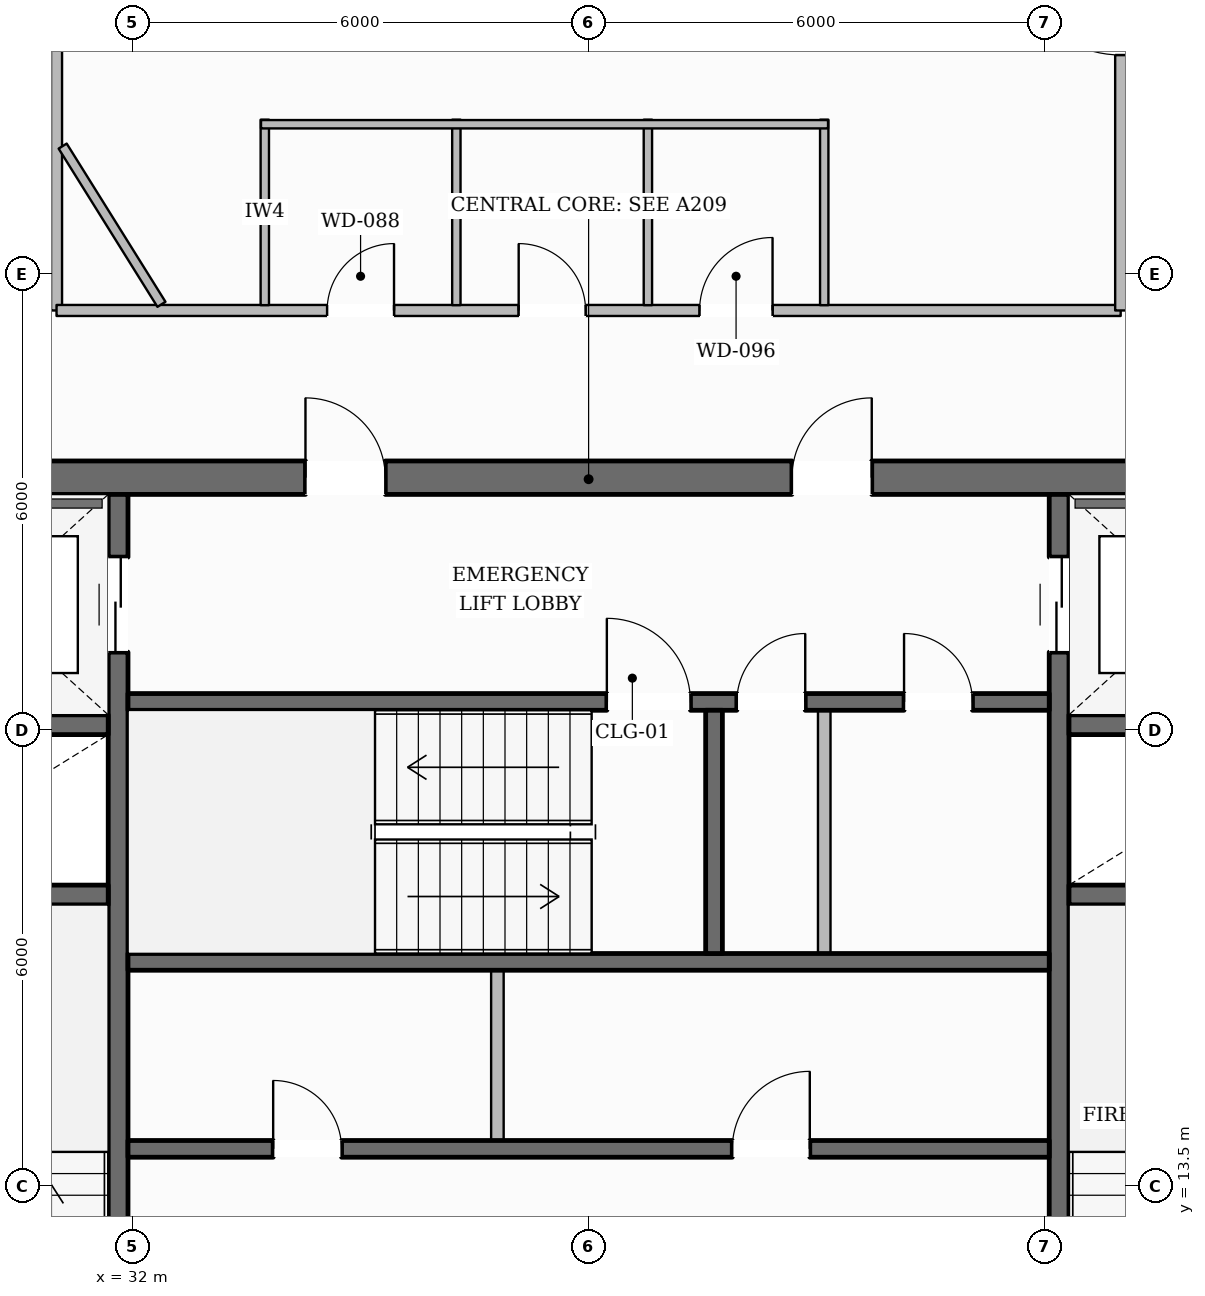
"""IFC4 building model, lengths in metres.
Left out: names, types, materials, properties, quantities, classifications, styles, units other than length and angle.
Written with IfcOpenShell. Run it as: python <this file> out.ifc"""

import sys

from ifc_helpers import new_model, si_unit, direction, frame, frame_2d, origin, place, context, subcontext, project, spatial, rectangle, extrude, element, fill, save


model = new_model("IFC4")
c1 = context("Model", 3, precision=1e-05, world=origin(), true_north=direction((0.0, 1.0)))
c2 = subcontext(c1, "Body", "Model", "MODEL_VIEW")
j1 = project(units=[si_unit("LENGTHUNIT", "METRE"), si_unit("PLANEANGLEUNIT", "RADIAN")], contexts=[c1])
p1 = place(None, origin())
s1 = spatial("IfcSite", under=j1, at=p1, CompositionType="ELEMENT")
p2 = place(p1, origin())
s2 = spatial("IfcBuilding", under=s1, at=p2, CompositionType="ELEMENT")
p3 = place(p2, frame((0.0, 0.0, 215.05)))
s3 = spatial("IfcBuildingStorey", under=s2, at=p3, CompositionType="ELEMENT", Elevation=215.05)
p4 = place(p3, frame((28.04, 22.82, 0.0), z_axis=(0.0, 0.0, 1.0), x_axis=(1.0, 0.0, 0.0)))
e1 = element("IfcWall", 1, at=p4, inside=s3, PredefinedType="SOLIDWALL", context=c2, shape_type="SweptSolid", body=[
    extrude(rectangle(XDim=19.92, YDim=0.44, at=frame_2d((9.96, 0.0))), origin(), (0.0, 0.0, 1.0), 3.6),
])
p5 = place(p4, frame((6.235, 0.0, 0.0)))
e2 = element("IfcOpeningElement", 2, at=p5, cuts=e1, PredefinedType="OPENING", context=c2, shape_type="SweptSolid", body=[
    extrude(rectangle(XDim=1.05, YDim=2.15, at=frame_2d((0.525, 1.075))), frame((0.0, 0.23, 0.0), z_axis=(0.0, -1.0, 0.0), x_axis=(1.0, 0.0, 0.0)), (0.0, 0.0, 1.0), 0.46),
])
p6 = place(p4, frame((12.635, 0.0, 0.0)))
e3 = element("IfcOpeningElement", 3, at=p6, cuts=e1, PredefinedType="OPENING", context=c2, shape_type="SweptSolid", body=[
    extrude(rectangle(XDim=1.05, YDim=2.15, at=frame_2d((0.525, 1.075))), frame((0.0, 0.23, 0.0), z_axis=(0.0, -1.0, 0.0), x_axis=(1.0, 0.0, 0.0)), (0.0, 0.0, 1.0), 0.46),
])
p7 = place(p3, frame((31.81, 9.6, 0.0), z_axis=(0.0, 0.0, 1.0), x_axis=(0.0, 1.0, 0.0)))
e4 = element("IfcWall", 4, at=p7, inside=s3, PredefinedType="SHEAR", context=c2, shape_type="SweptSolid", body=[
    extrude(rectangle(XDim=13.0, YDim=0.26, at=frame_2d((6.5, 0.0))), origin(), (0.0, 0.0, 1.0), 3.6),
])
p8 = place(p7, frame((10.925, 0.0, 0.0)))
e5 = element("IfcOpeningElement", 5, at=p8, cuts=e4, PredefinedType="OPENING", context=c2, shape_type="SweptSolid", body=[
    extrude(rectangle(XDim=1.25, YDim=2.25, at=frame_2d((0.625, 1.125))), frame((0.0, 0.14, 0.0), z_axis=(0.0, -1.0, 0.0), x_axis=(1.0, 0.0, 0.0)), (0.0, 0.0, 1.0), 0.28),
])
p9 = place(p3, frame((44.19, 9.6, 0.0), z_axis=(0.0, 0.0, 1.0), x_axis=(0.0, 1.0, 0.0)))
e6 = element("IfcWall", 6, at=p9, inside=s3, PredefinedType="SHEAR", context=c2, shape_type="SweptSolid", body=[
    extrude(rectangle(XDim=13.0, YDim=0.26, at=frame_2d((6.5, 0.0))), origin(), (0.0, 0.0, 1.0), 3.6),
])
p10 = place(p9, frame((10.925, 0.0, 0.0)))
e7 = element("IfcOpeningElement", 7, at=p10, cuts=e6, PredefinedType="OPENING", context=c2, shape_type="SweptSolid", body=[
    extrude(rectangle(XDim=1.25, YDim=2.25, at=frame_2d((0.625, 1.125))), frame((0.0, 0.14, 0.0), z_axis=(0.0, -1.0, 0.0), x_axis=(1.0, 0.0, 0.0)), (0.0, 0.0, 1.0), 0.28),
])
for number, where, z_axis, x_axis in (
    (8, (28.48, 17.33, 0.0), (0.0, 0.0, 1.0), (1.0, 0.0, 0.0)),
    (9, (28.48, 19.57, 0.0), (0.0, 0.0, 1.0), (1.0, 0.0, 0.0)),
    (10, (44.32, 17.33, 0.0), (0.0, 0.0, 1.0), (1.0, 0.0, 0.0)),
    (11, (44.32, 19.57, 0.0), (0.0, 0.0, 1.0), (1.0, 0.0, 0.0)),
):
    element("IfcWall", number, at=place(p3, frame(where, z_axis=z_axis, x_axis=x_axis)), inside=s3, PredefinedType="SHEAR", context=c2, shape_type="SweptSolid", body=[
        extrude(rectangle(XDim=3.2, YDim=0.26, at=frame_2d((1.6, 0.0))), origin(), (0.0, 0.0, 1.0), 3.6),
    ])
p11 = place(p3, frame((31.94, 19.87, 0.0), z_axis=(0.0, 0.0, 1.0), x_axis=(1.0, 0.0, 0.0)))
e12 = element("IfcWall", 12, at=p11, inside=s3, PredefinedType="SOLIDWALL", context=c2, shape_type="SweptSolid", body=[
    extrude(rectangle(XDim=12.12, YDim=0.22, at=frame_2d((6.06, 0.0))), origin(), (0.0, 0.0, 1.0), 3.6),
])
p12 = place(p11, frame((6.3, 0.0, 0.0)))
e13 = element("IfcOpeningElement", 13, at=p12, cuts=e12, PredefinedType="OPENING", context=c2, shape_type="SweptSolid", body=[
    extrude(rectangle(XDim=1.1, YDim=2.15, at=frame_2d((0.55, 1.075))), frame((0.0, 0.12, 0.0), z_axis=(0.0, -1.0, 0.0), x_axis=(1.0, 0.0, 0.0)), (0.0, 0.0, 1.0), 0.24),
])
p13 = place(p11, frame((8.01, 0.0, 0.0)))
e14 = element("IfcOpeningElement", 14, at=p13, cuts=e12, PredefinedType="OPENING", context=c2, shape_type="SweptSolid", body=[
    extrude(rectangle(XDim=0.9, YDim=2.1, at=frame_2d((0.45, 1.05))), frame((0.0, 0.12, 0.0), z_axis=(0.0, -1.0, 0.0), x_axis=(1.0, 0.0, 0.0)), (0.0, 0.0, 1.0), 0.24),
])
p14 = place(p11, frame((10.21, 0.0, 0.0)))
e15 = element("IfcOpeningElement", 15, at=p14, cuts=e12, PredefinedType="OPENING", context=c2, shape_type="SweptSolid", body=[
    extrude(rectangle(XDim=0.9, YDim=2.1, at=frame_2d((0.45, 1.05))), frame((0.0, 0.12, 0.0), z_axis=(0.0, -1.0, 0.0), x_axis=(1.0, 0.0, 0.0)), (0.0, 0.0, 1.0), 0.24),
])
p15 = place(p3, frame((31.94, 16.45, 0.0), z_axis=(0.0, 0.0, 1.0), x_axis=(1.0, 0.0, 0.0)))
e16 = element("IfcWall", 16, at=p15, inside=s3, PredefinedType="SOLIDWALL", context=c2, shape_type="SweptSolid", body=[
    extrude(rectangle(XDim=12.12, YDim=0.22, at=frame_2d((6.06, 0.0))), origin(), (0.0, 0.0, 1.0), 3.6),
])
p16 = place(p3, frame((39.65, 16.56, 0.0), z_axis=(0.0, 0.0, 1.0), x_axis=(0.0, 1.0, 0.0)))
e17 = element("IfcWall", 17, at=p16, inside=s3, PredefinedType="SOLIDWALL", context=c2, shape_type="SweptSolid", body=[
    extrude(rectangle(XDim=3.2, YDim=0.22, at=frame_2d((1.6, 0.0))), origin(), (0.0, 0.0, 1.0), 3.6),
])
p17 = place(p3, frame((31.94, 13.99, 0.0), z_axis=(0.0, 0.0, 1.0), x_axis=(1.0, 0.0, 0.0)))
e18 = element("IfcWall", 18, at=p17, inside=s3, PredefinedType="SOLIDWALL", context=c2, shape_type="SweptSolid", body=[
    extrude(rectangle(XDim=12.12, YDim=0.22, at=frame_2d((6.06, 0.0))), origin(), (0.0, 0.0, 1.0), 3.6),
])
p18 = place(p17, frame((1.91, 0.0, 0.0)))
e19 = element("IfcOpeningElement", 19, at=p18, cuts=e18, PredefinedType="OPENING", context=c2, shape_type="SweptSolid", body=[
    extrude(rectangle(XDim=0.9, YDim=2.1, at=frame_2d((0.45, 1.05))), frame((0.0, 0.12, 0.0), z_axis=(0.0, -1.0, 0.0), x_axis=(1.0, 0.0, 0.0)), (0.0, 0.0, 1.0), 0.24),
])
p19 = place(p17, frame((7.95, 0.0, 0.0)))
e20 = element("IfcOpeningElement", 20, at=p19, cuts=e18, PredefinedType="OPENING", context=c2, shape_type="SweptSolid", body=[
    extrude(rectangle(XDim=1.02, YDim=2.15, at=frame_2d((0.51, 1.075))), frame((0.0, 0.12, 0.0), z_axis=(0.0, -1.0, 0.0), x_axis=(1.0, 0.0, 0.0)), (0.0, 0.0, 1.0), 0.24),
])
p20 = place(p3, frame((14.13, 10.825, 0.0), z_axis=(0.0, 0.0, 1.0), x_axis=(0.506658543763, 0.862146808863, 0.0)))
e21 = element("IfcWall", 21, at=p20, inside=s3, PredefinedType="STANDARD", context=c2, shape_type="SweptSolid", body=[
    extrude(rectangle(XDim=39.014, YDim=0.35, at=frame_2d((19.507, 0.0))), origin(), (0.0, 0.0, 1.0), 3.132),
])
p21 = place(p20, frame((9.354, 0.0, 0.0)))
e22 = element("IfcOpeningElement", 22, at=p21, cuts=e21, PredefinedType="OPENING", context=c2, shape_type="SweptSolid", body=[
    extrude(rectangle(XDim=1.0, YDim=2.2, at=frame_2d((0.5, 1.1))), frame((0.0, 0.185, 0.0), z_axis=(0.0, -1.0, 0.0), x_axis=(1.0, 0.0, 0.0)), (0.0, 0.0, 1.0), 0.37),
])
p22 = place(p20, frame((34.645, 0.0, 0.65)))
e23 = element("IfcOpeningElement", 23, at=p22, cuts=e21, PredefinedType="OPENING", context=c2, shape_type="SweptSolid", body=[
    extrude(rectangle(XDim=1.45, YDim=1.75, at=frame_2d((0.725, 0.875))), frame((0.0, 0.185, 0.0), z_axis=(0.0, -1.0, 0.0), x_axis=(1.0, 0.0, 0.0)), (0.0, 0.0, 1.0), 0.37),
])
p23 = place(p20, frame((28.301, 0.0, 0.65)))
e24 = element("IfcOpeningElement", 24, at=p23, cuts=e21, PredefinedType="OPENING", context=c2, shape_type="SweptSolid", body=[
    extrude(rectangle(XDim=1.45, YDim=1.75, at=frame_2d((0.725, 0.875))), frame((0.0, 0.185, 0.0), z_axis=(0.0, -1.0, 0.0), x_axis=(1.0, 0.0, 0.0)), (0.0, 0.0, 1.0), 0.37),
])
p24 = place(p20, frame((21.958, 0.0, 0.65)))
e25 = element("IfcOpeningElement", 25, at=p24, cuts=e21, PredefinedType="OPENING", context=c2, shape_type="SweptSolid", body=[
    extrude(rectangle(XDim=1.45, YDim=1.75, at=frame_2d((0.725, 0.875))), frame((0.0, 0.185, 0.0), z_axis=(0.0, -1.0, 0.0), x_axis=(1.0, 0.0, 0.0)), (0.0, 0.0, 1.0), 0.37),
])
p25 = place(p20, frame((2.926, 0.0, 0.65)))
e26 = element("IfcOpeningElement", 26, at=p25, cuts=e21, PredefinedType="OPENING", context=c2, shape_type="SweptSolid", body=[
    extrude(rectangle(XDim=1.45, YDim=1.75, at=frame_2d((0.725, 0.875))), frame((0.0, 0.185, 0.0), z_axis=(0.0, -1.0, 0.0), x_axis=(1.0, 0.0, 0.0)), (0.0, 0.0, 1.0), 0.37),
])
p26 = place(p3, frame((41.969, 44.54, 0.0), z_axis=(0.0, 0.0, 1.0), x_axis=(0.498884596562, -0.866668425243, 0.0)))
e27 = element("IfcWall", 27, at=p26, inside=s3, PredefinedType="STANDARD", context=c2, shape_type="SweptSolid", body=[
    extrude(rectangle(XDim=38.412, YDim=0.35, at=frame_2d((19.206, 0.0))), origin(), (0.0, 0.0, 1.0), 3.132),
])
p27 = place(p26, frame((34.087, 0.0, 0.65)))
e28 = element("IfcOpeningElement", 28, at=p27, cuts=e27, PredefinedType="OPENING", context=c2, shape_type="SweptSolid", body=[
    extrude(rectangle(XDim=1.45, YDim=1.75, at=frame_2d((0.725, 0.875))), frame((0.0, 0.185, 0.0), z_axis=(0.0, -1.0, 0.0), x_axis=(1.0, 0.0, 0.0)), (0.0, 0.0, 1.0), 0.37),
])
p28 = place(p26, frame((27.845, 0.0, 0.65)))
e29 = element("IfcOpeningElement", 29, at=p28, cuts=e27, PredefinedType="OPENING", context=c2, shape_type="SweptSolid", body=[
    extrude(rectangle(XDim=1.45, YDim=1.75, at=frame_2d((0.725, 0.875))), frame((0.0, 0.185, 0.0), z_axis=(0.0, -1.0, 0.0), x_axis=(1.0, 0.0, 0.0)), (0.0, 0.0, 1.0), 0.37),
])
p29 = place(p26, frame((21.603, 0.0, 0.65)))
e30 = element("IfcOpeningElement", 30, at=p29, cuts=e27, PredefinedType="OPENING", context=c2, shape_type="SweptSolid", body=[
    extrude(rectangle(XDim=1.45, YDim=1.75, at=frame_2d((0.725, 0.875))), frame((0.0, 0.185, 0.0), z_axis=(0.0, -1.0, 0.0), x_axis=(1.0, 0.0, 0.0)), (0.0, 0.0, 1.0), 0.37),
])
p30 = place(p26, frame((9.119, 0.0, 0.65)))
e31 = element("IfcOpeningElement", 31, at=p30, cuts=e27, PredefinedType="OPENING", context=c2, shape_type="SweptSolid", body=[
    extrude(rectangle(XDim=1.45, YDim=1.75, at=frame_2d((0.725, 0.875))), frame((0.0, 0.185, 0.0), z_axis=(0.0, -1.0, 0.0), x_axis=(1.0, 0.0, 0.0)), (0.0, 0.0, 1.0), 0.37),
])
p31 = place(p26, frame((2.876, 0.0, 0.65)))
e32 = element("IfcOpeningElement", 32, at=p31, cuts=e27, PredefinedType="OPENING", context=c2, shape_type="SweptSolid", body=[
    extrude(rectangle(XDim=1.45, YDim=1.75, at=frame_2d((0.725, 0.875))), frame((0.0, 0.185, 0.0), z_axis=(0.0, -1.0, 0.0), x_axis=(1.0, 0.0, 0.0)), (0.0, 0.0, 1.0), 0.37),
])
p32 = place(p3, frame((36.8, 14.1, 0.0), z_axis=(0.0, 0.0, 1.0), x_axis=(0.0, 1.0, 0.0)))
e33 = element("IfcWall", 33, at=p32, inside=s3, PredefinedType="PARTITIONING", context=c2, shape_type="SweptSolid", body=[
    extrude(rectangle(XDim=2.24, YDim=0.165, at=frame_2d((1.12, 0.0))), origin(), (0.0, 0.0, 1.0), 3.6),
])
p33 = place(p3, frame((41.1, 16.56, 0.0), z_axis=(0.0, 0.0, 1.0), x_axis=(0.0, 1.0, 0.0)))
e34 = element("IfcWall", 34, at=p33, inside=s3, PredefinedType="PARTITIONING", context=c2, shape_type="SweptSolid", body=[
    extrude(rectangle(XDim=3.2, YDim=0.165, at=frame_2d((1.6, 0.0))), origin(), (0.0, 0.0, 1.0), 3.6),
])
p34 = place(p3, frame((31.0, 33.492, 0.0), z_axis=(0.0, 0.0, 1.0), x_axis=(0.0, -1.0, 0.0)))
e35 = element("IfcWall", 35, at=p34, inside=s3, PredefinedType="PARTITIONING", context=c2, shape_type="SweptSolid", body=[
    extrude(rectangle(XDim=8.472, YDim=0.145, at=frame_2d((4.236, 0.0))), origin(), (0.0, 0.0, 1.0), 3.6),
])
p35 = place(p3, frame((31.0, 25.02, 0.0), z_axis=(0.0, 0.0, 1.0), x_axis=(1.0, 0.0, 0.0)))
e36 = element("IfcWall", 36, at=p35, inside=s3, PredefinedType="PARTITIONING", context=c2, shape_type="SweptSolid", body=[
    extrude(rectangle(XDim=14.0, YDim=0.145, at=frame_2d((7.0, 0.0))), origin(), (0.0, 0.0, 1.0), 3.6),
])
p36 = place(p35, frame((3.56, 0.0, 0.0)))
e37 = element("IfcOpeningElement", 37, at=p36, cuts=e36, PredefinedType="OPENING", context=c2, shape_type="SweptSolid", body=[
    extrude(rectangle(XDim=0.88, YDim=2.1, at=frame_2d((0.44, 1.05))), frame((0.0, 0.083, 0.0), z_axis=(0.0, -1.0, 0.0), x_axis=(1.0, 0.0, 0.0)), (0.0, 0.0, 1.0), 0.165),
])
p37 = place(p35, frame((6.08, 0.0, 0.0)))
e38 = element("IfcOpeningElement", 38, at=p37, cuts=e36, PredefinedType="OPENING", context=c2, shape_type="SweptSolid", body=[
    extrude(rectangle(XDim=0.88, YDim=2.1, at=frame_2d((0.44, 1.05))), frame((0.0, 0.083, 0.0), z_axis=(0.0, -1.0, 0.0), x_axis=(1.0, 0.0, 0.0)), (0.0, 0.0, 1.0), 0.165),
])
p38 = place(p35, frame((8.46, 0.0, 0.0)))
e39 = element("IfcOpeningElement", 39, at=p38, cuts=e36, PredefinedType="OPENING", context=c2, shape_type="SweptSolid", body=[
    extrude(rectangle(XDim=0.96, YDim=2.1, at=frame_2d((0.48, 1.05))), frame((0.0, 0.083, 0.0), z_axis=(0.0, -1.0, 0.0), x_axis=(1.0, 0.0, 0.0)), (0.0, 0.0, 1.0), 0.165),
])
p39 = place(p3, frame((45.0, 25.02, 0.0), z_axis=(0.0, 0.0, 1.0), x_axis=(0.0, 1.0, 0.0)))
e40 = element("IfcWall", 40, at=p39, inside=s3, PredefinedType="PARTITIONING", context=c2, shape_type="SweptSolid", body=[
    extrude(rectangle(XDim=8.122, YDim=0.145, at=frame_2d((4.061, 0.0))), origin(), (0.0, 0.0, 1.0), 3.141),
])
p40 = place(p39, frame((3.361, 0.0, 0.0)))
e41 = element("IfcOpeningElement", 41, at=p40, cuts=e40, PredefinedType="OPENING", context=c2, shape_type="SweptSolid", body=[
    extrude(rectangle(XDim=1.4, YDim=2.2, at=frame_2d((0.7, 1.1))), frame((0.0, 0.083, 0.0), z_axis=(0.0, -1.0, 0.0), x_axis=(1.0, 0.0, 0.0)), (0.0, 0.0, 1.0), 0.165),
])
p41 = place(p3, frame((33.74, 25.09, 0.0), z_axis=(0.0, 0.0, 1.0), x_axis=(0.0, 1.0, 0.0)))
e42 = element("IfcWall", 42, at=p41, inside=s3, PredefinedType="PLUMBINGWALL", context=c2, shape_type="SweptSolid", body=[
    extrude(rectangle(XDim=2.44, YDim=0.11, at=frame_2d((1.22, 0.0))), origin(), (0.0, 0.0, 1.0), 3.141),
])
for number, where, z_axis, x_axis in (
    (43, (36.26, 25.09, 0.0), (0.0, 0.0, 1.0), (0.0, 1.0, 0.0)),
    (44, (38.78, 25.09, 0.0), (0.0, 0.0, 1.0), (0.0, 1.0, 0.0)),
    (45, (41.1, 25.09, 0.0), (0.0, 0.0, 1.0), (0.0, 1.0, 0.0)),
):
    element("IfcWall", number, at=place(p3, frame(where, z_axis=z_axis, x_axis=x_axis)), inside=s3, PredefinedType="PLUMBINGWALL", context=c2, shape_type="SweptSolid", body=[
        extrude(rectangle(XDim=2.44, YDim=0.11, at=frame_2d((1.22, 0.0))), origin(), (0.0, 0.0, 1.0), 3.6),
    ])
p42 = place(p3, frame((33.69, 27.47, 0.0), z_axis=(0.0, 0.0, 1.0), x_axis=(1.0, 0.0, 0.0)))
e46 = element("IfcWall", 46, at=p42, inside=s3, PredefinedType="PLUMBINGWALL", context=c2, shape_type="SweptSolid", body=[
    extrude(rectangle(XDim=7.46, YDim=0.11, at=frame_2d((3.73, 0.0))), origin(), (0.0, 0.0, 1.0), 3.6),
])
p43 = place(p3, frame((32.38, 25.101, 0.0), z_axis=(0.0, 0.0, 1.0), x_axis=(-0.529569705145, 0.84826642477, 0.0)))
e47 = element("IfcWall", 47, at=p43, inside=s3, PredefinedType="PARTITIONING", context=c2, shape_type="SweptSolid", body=[
    extrude(rectangle(XDim=2.454, YDim=0.125, at=frame_2d((1.227, 0.0))), origin(), (0.0, 0.0, 1.0), 3.6),
])
p44 = place(p12, origin())
e48 = element("IfcDoor", 48, at=p44, inside=s3, OperationType="SINGLE_SWING_LEFT", PredefinedType="DOOR", context=c2, shape_type="SweptSolid", body=[
    extrude(rectangle(XDim=1.1, YDim=2.15, at=frame_2d((0.55, 1.075))), frame((0.0, 0.025, 0.0), z_axis=(0.0, -1.0, 0.0), x_axis=(1.0, 0.0, 0.0)), (0.0, 0.0, 1.0), 0.05),
])
fill(e13, e48)
p45 = place(p5, origin())
e49 = element("IfcDoor", 49, at=p45, inside=s3, OperationType="SINGLE_SWING_LEFT", PredefinedType="DOOR", context=c2, shape_type="SweptSolid", body=[
    extrude(rectangle(XDim=1.05, YDim=2.15, at=frame_2d((0.525, 1.075))), frame((0.0, 0.025, 0.0), z_axis=(0.0, -1.0, 0.0), x_axis=(1.0, 0.0, 0.0)), (0.0, 0.0, 1.0), 0.05),
])
fill(e2, e49)
p46 = place(p6, origin())
e50 = element("IfcDoor", 50, at=p46, inside=s3, OperationType="SINGLE_SWING_RIGHT", PredefinedType="DOOR", context=c2, shape_type="SweptSolid", body=[
    extrude(rectangle(XDim=1.05, YDim=2.15, at=frame_2d((0.525, 1.075))), frame((0.0, 0.025, 0.0), z_axis=(0.0, -1.0, 0.0), x_axis=(1.0, 0.0, 0.0)), (0.0, 0.0, 1.0), 0.05),
])
fill(e3, e50)
p47 = place(p8, origin())
e51 = element("IfcDoor", 51, at=p47, inside=s3, OperationType="DOUBLE_DOOR_SLIDING", PredefinedType="DOOR", context=c2, shape_type="SweptSolid", body=[
    extrude(rectangle(XDim=1.25, YDim=2.25, at=frame_2d((0.625, 1.125))), frame((0.0, 0.025, 0.0), z_axis=(0.0, -1.0, 0.0), x_axis=(1.0, 0.0, 0.0)), (0.0, 0.0, 1.0), 0.05),
])
fill(e5, e51)
p48 = place(p10, origin())
e52 = element("IfcDoor", 52, at=p48, inside=s3, OperationType="DOUBLE_DOOR_SLIDING", PredefinedType="DOOR", context=c2, shape_type="SweptSolid", body=[
    extrude(rectangle(XDim=1.25, YDim=2.25, at=frame_2d((0.625, 1.125))), frame((0.0, 0.025, 0.0), z_axis=(0.0, -1.0, 0.0), x_axis=(1.0, 0.0, 0.0)), (0.0, 0.0, 1.0), 0.05),
])
fill(e7, e52)
p49 = place(p18, origin())
e53 = element("IfcDoor", 53, at=p49, inside=s3, OperationType="SINGLE_SWING_LEFT", PredefinedType="DOOR", context=c2, shape_type="SweptSolid", body=[
    extrude(rectangle(XDim=0.9, YDim=2.1, at=frame_2d((0.45, 1.05))), frame((0.0, 0.025, 0.0), z_axis=(0.0, -1.0, 0.0), x_axis=(1.0, 0.0, 0.0)), (0.0, 0.0, 1.0), 0.05),
])
fill(e19, e53)
p50 = place(p19, origin())
e54 = element("IfcDoor", 54, at=p50, inside=s3, OperationType="SINGLE_SWING_RIGHT", PredefinedType="DOOR", context=c2, shape_type="SweptSolid", body=[
    extrude(rectangle(XDim=1.02, YDim=2.15, at=frame_2d((0.51, 1.075))), frame((0.0, 0.025, 0.0), z_axis=(0.0, -1.0, 0.0), x_axis=(1.0, 0.0, 0.0)), (0.0, 0.0, 1.0), 0.05),
])
fill(e20, e54)
p51 = place(p13, origin())
e55 = element("IfcDoor", 55, at=p51, inside=s3, OperationType="SINGLE_SWING_RIGHT", PredefinedType="DOOR", context=c2, shape_type="SweptSolid", body=[
    extrude(rectangle(XDim=0.9, YDim=2.1, at=frame_2d((0.45, 1.05))), frame((0.0, 0.025, 0.0), z_axis=(0.0, -1.0, 0.0), x_axis=(1.0, 0.0, 0.0)), (0.0, 0.0, 1.0), 0.05),
])
fill(e14, e55)
p52 = place(p14, origin())
e56 = element("IfcDoor", 56, at=p52, inside=s3, OperationType="SINGLE_SWING_LEFT", PredefinedType="DOOR", context=c2, shape_type="SweptSolid", body=[
    extrude(rectangle(XDim=0.9, YDim=2.1, at=frame_2d((0.45, 1.05))), frame((0.0, 0.025, 0.0), z_axis=(0.0, -1.0, 0.0), x_axis=(1.0, 0.0, 0.0)), (0.0, 0.0, 1.0), 0.05),
])
fill(e15, e56)
p53 = place(p36, origin())
e57 = element("IfcDoor", 57, at=p53, inside=s3, OperationType="SINGLE_SWING_RIGHT", PredefinedType="DOOR", context=c2, shape_type="SweptSolid", body=[
    extrude(rectangle(XDim=0.88, YDim=2.1, at=frame_2d((0.44, 1.05))), frame((0.0, 0.025, 0.0), z_axis=(0.0, -1.0, 0.0), x_axis=(1.0, 0.0, 0.0)), (0.0, 0.0, 1.0), 0.05),
])
fill(e37, e57)
p54 = place(p37, origin())
e58 = element("IfcDoor", 58, at=p54, inside=s3, OperationType="SINGLE_SWING_LEFT", PredefinedType="DOOR", context=c2, shape_type="SweptSolid", body=[
    extrude(rectangle(XDim=0.88, YDim=2.1, at=frame_2d((0.44, 1.05))), frame((0.0, 0.025, 0.0), z_axis=(0.0, -1.0, 0.0), x_axis=(1.0, 0.0, 0.0)), (0.0, 0.0, 1.0), 0.05),
])
fill(e38, e58)
p55 = place(p38, origin())
e59 = element("IfcDoor", 59, at=p55, inside=s3, OperationType="SINGLE_SWING_RIGHT", PredefinedType="DOOR", context=c2, shape_type="SweptSolid", body=[
    extrude(rectangle(XDim=0.96, YDim=2.1, at=frame_2d((0.48, 1.05))), frame((0.0, 0.025, 0.0), z_axis=(0.0, -1.0, 0.0), x_axis=(1.0, 0.0, 0.0)), (0.0, 0.0, 1.0), 0.05),
])
fill(e39, e59)
p56 = place(p40, origin())
e60 = element("IfcDoor", 60, at=p56, inside=s3, OperationType="SINGLE_SWING_RIGHT", PredefinedType="DOOR", context=c2, shape_type="SweptSolid", body=[
    extrude(rectangle(XDim=1.4, YDim=2.2, at=frame_2d((0.7, 1.1))), frame((0.0, 0.025, 0.0), z_axis=(0.0, -1.0, 0.0), x_axis=(1.0, 0.0, 0.0)), (0.0, 0.0, 1.0), 0.05),
])
fill(e41, e60)
save(model, sys.argv[1])
